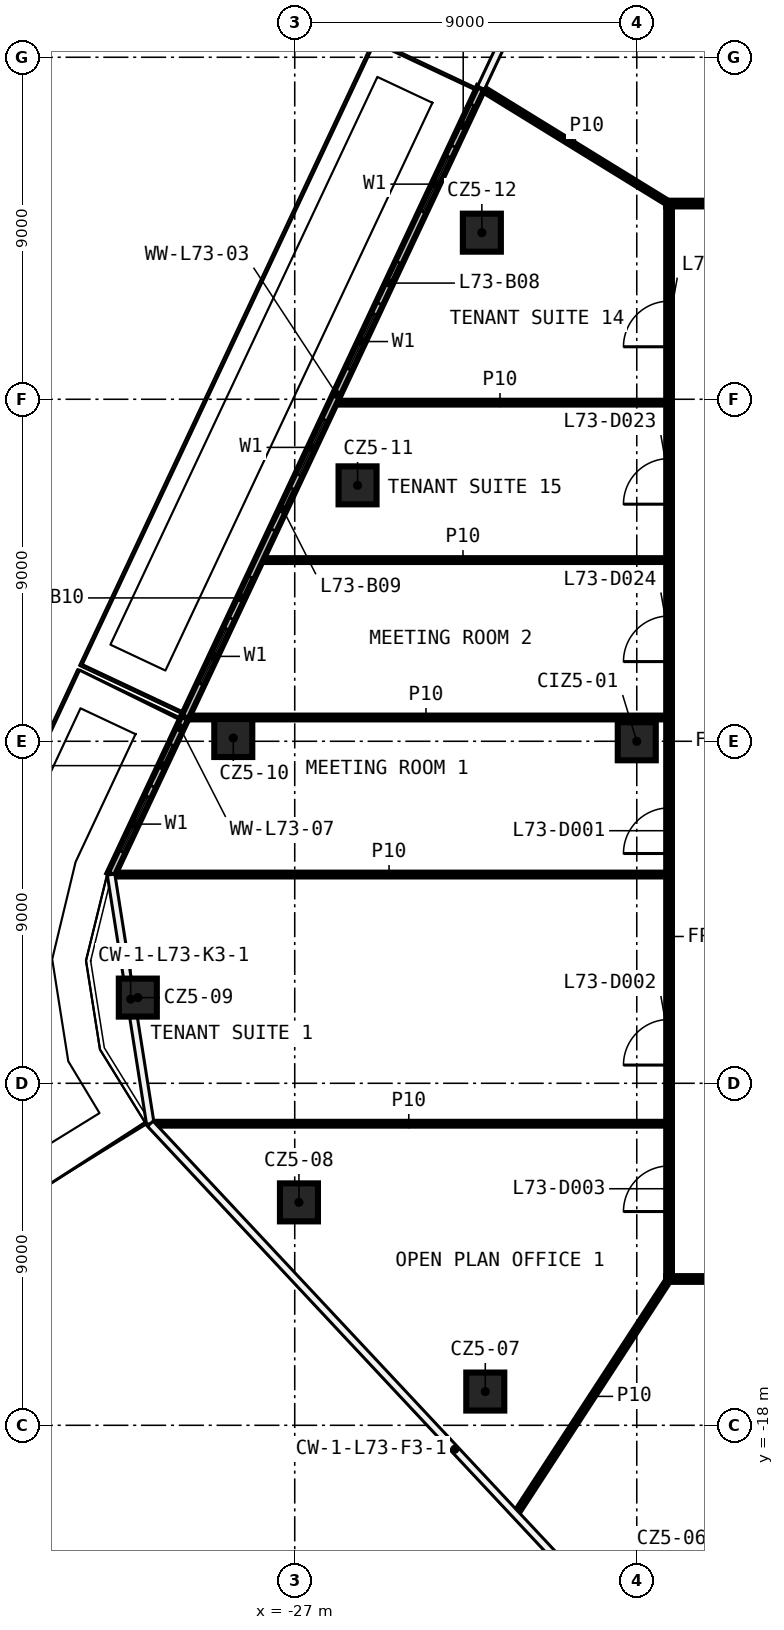
"""IFC4 building model, lengths in metres.
Left out: names, types, materials, properties, quantities, classifications, styles, units other than length and angle.
Written with IfcOpenShell. Run it as: python <this file> out.ifc"""

import sys

from ifc_helpers import new_model, si_unit, direction, frame, frame_2d, origin, origin_2d, place, context, subcontext, project, spatial, rectangle, extrude, element, fill, save


model = new_model("IFC4")
c1 = context("Model", 3, precision=1e-05, world=origin(), true_north=direction((0.0, 1.0)))
c2 = subcontext(c1, "Body", "Model", "MODEL_VIEW")
j1 = project(units=[si_unit("LENGTHUNIT", "METRE"), si_unit("PLANEANGLEUNIT", "RADIAN")], contexts=[c1])
p1 = place(None, origin())
s1 = spatial("IfcSite", under=j1, at=p1, CompositionType="ELEMENT")
p2 = place(p1, origin())
s2 = spatial("IfcBuilding", under=s1, at=p2, CompositionType="ELEMENT")
p3 = place(p2, frame((0.0, 0.0, 340.4)))
s3 = spatial("IfcBuildingStorey", under=s2, at=p3, CompositionType="ELEMENT", Elevation=340.4)
for number, where, z_axis, x_axis in (
    (1, (-21.986, -17.112, 0.0), (0.0, 0.0, 1.0), (1.0, 0.0, 0.0)),
    (2, (-26.889, -12.134, 0.0), (0.0, 0.0, 1.0), (1.0, 0.0, 0.0)),
    (3, (-31.129, -6.745, 0.0), (0.0, 0.0, 1.0), (1.0, 0.0, 0.0)),
    (4, (-28.617, 0.086, 0.0), (0.0, 0.0, 1.0), (1.0, 0.0, 0.0)),
    (5, (-25.347, 6.735, 0.0), (0.0, 0.0, 1.0), (1.0, 0.0, 0.0)),
    (6, (-22.076, 13.384, 0.0), (0.0, 0.0, 1.0), (1.0, 0.0, 0.0)),
    (7, (-18.0, 0.0, 0.0), (0.0, 0.0, 1.0), (1.0, 0.0, 0.0)),
):
    element("IfcColumn", number, at=place(p3, frame(where, z_axis=z_axis, x_axis=x_axis)), inside=s3, PredefinedType="COLUMN", context=c2, shape_type="SweptSolid", body=[
        extrude(rectangle(XDim=1.0, YDim=1.0, at=origin_2d()), origin(), (0.0, 0.0, 1.0), 3.82),
    ])
p4 = place(p3, frame((17.225, -14.15, 0.0), z_axis=(0.0, 0.0, 1.0), x_axis=(-1.0, 0.0, 0.0)))
e8 = element("IfcWall", 8, at=p4, inside=s3, PredefinedType="PARTITIONING", context=c2, shape_type="SweptSolid", body=[
    extrude(rectangle(XDim=34.45, YDim=0.15, at=frame_2d((17.225, 0.0))), origin(), (0.0, 0.0, 1.0), 3.82),
])
p5 = place(p4, frame((24.639, 0.0, 0.0)))
e9 = element("IfcOpeningElement", 9, at=p5, cuts=e8, PredefinedType="OPENING", context=c2, shape_type="SweptSolid", body=[
    extrude(rectangle(XDim=1.2, YDim=2.1, at=frame_2d((0.6, 1.05))), frame((0.0, 0.085, 0.0), z_axis=(0.0, -1.0, 0.0), x_axis=(1.0, 0.0, 0.0)), (0.0, 0.0, 1.0), 0.17),
])
p6 = place(p4, frame((20.005, 0.0, 0.0)))
e10 = element("IfcOpeningElement", 10, at=p6, cuts=e8, PredefinedType="OPENING", context=c2, shape_type="SweptSolid", body=[
    extrude(rectangle(XDim=1.2, YDim=2.1, at=frame_2d((0.6, 1.05))), frame((0.0, 0.085, 0.0), z_axis=(0.0, -1.0, 0.0), x_axis=(1.0, 0.0, 0.0)), (0.0, 0.0, 1.0), 0.17),
])
p7 = place(p4, frame((15.367, 0.0, 0.0)))
e11 = element("IfcOpeningElement", 11, at=p7, cuts=e8, PredefinedType="OPENING", context=c2, shape_type="SweptSolid", body=[
    extrude(rectangle(XDim=1.2, YDim=2.1, at=frame_2d((0.6, 1.05))), frame((0.0, 0.085, 0.0), z_axis=(0.0, -1.0, 0.0), x_axis=(1.0, 0.0, 0.0)), (0.0, 0.0, 1.0), 0.17),
])
p8 = place(p4, frame((10.73, 0.0, 0.0)))
e12 = element("IfcOpeningElement", 12, at=p8, cuts=e8, PredefinedType="OPENING", context=c2, shape_type="SweptSolid", body=[
    extrude(rectangle(XDim=1.2, YDim=2.1, at=frame_2d((0.6, 1.05))), frame((0.0, 0.085, 0.0), z_axis=(0.0, -1.0, 0.0), x_axis=(1.0, 0.0, 0.0)), (0.0, 0.0, 1.0), 0.17),
])
p9 = place(p4, frame((6.097, 0.0, 0.0)))
e13 = element("IfcOpeningElement", 13, at=p9, cuts=e8, PredefinedType="OPENING", context=c2, shape_type="SweptSolid", body=[
    extrude(rectangle(XDim=1.2, YDim=2.1, at=frame_2d((0.6, 1.05))), frame((0.0, 0.085, 0.0), z_axis=(0.0, -1.0, 0.0), x_axis=(1.0, 0.0, 0.0)), (0.0, 0.0, 1.0), 0.17),
])
p10 = place(p4, frame((1.83, 0.0, 0.0)))
e14 = element("IfcOpeningElement", 14, at=p10, cuts=e8, PredefinedType="OPENING", context=c2, shape_type="SweptSolid", body=[
    extrude(rectangle(XDim=1.2, YDim=2.1, at=frame_2d((0.6, 1.05))), frame((0.0, 0.085, 0.0), z_axis=(0.0, -1.0, 0.0), x_axis=(1.0, 0.0, 0.0)), (0.0, 0.0, 1.0), 0.17),
])
p11 = place(p3, frame((-30.773, -10.064, 0.0), z_axis=(0.0, 0.0, 1.0), x_axis=(1.0, 0.0, 0.0)))
e15 = element("IfcWall", 15, at=p11, inside=s3, PredefinedType="PARTITIONING", context=c2, shape_type="SweptSolid", body=[
    extrude(rectangle(XDim=13.548, YDim=0.1, at=frame_2d((6.774, 0.0))), origin(), (0.0, 0.0, 1.0), 3.82),
])
p12 = place(p3, frame((-31.811, -3.507, 0.0), z_axis=(0.0, 0.0, 1.0), x_axis=(1.0, 0.0, 0.0)))
e16 = element("IfcWall", 16, at=p12, inside=s3, PredefinedType="PARTITIONING", context=c2, shape_type="SweptSolid", body=[
    extrude(rectangle(XDim=14.586, YDim=0.1, at=frame_2d((7.293, 0.0))), origin(), (0.0, 0.0, 1.0), 3.82),
])
p13 = place(p3, frame((-29.867, 0.626, 0.0), z_axis=(0.0, 0.0, 1.0), x_axis=(1.0, 0.0, 0.0)))
e17 = element("IfcWall", 17, at=p13, inside=s3, PredefinedType="PARTITIONING", context=c2, shape_type="SweptSolid", body=[
    extrude(rectangle(XDim=12.642, YDim=0.1, at=frame_2d((6.321, 0.0))), origin(), (0.0, 0.0, 1.0), 3.82),
])
p14 = place(p3, frame((-27.92, 4.768, 0.0), z_axis=(0.0, 0.0, 1.0), x_axis=(1.0, 0.0, 0.0)))
e18 = element("IfcWall", 18, at=p14, inside=s3, PredefinedType="PARTITIONING", context=c2, shape_type="SweptSolid", body=[
    extrude(rectangle(XDim=10.695, YDim=0.1, at=frame_2d((5.347, 0.0))), origin(), (0.0, 0.0, 1.0), 3.82),
])
p15 = place(p3, frame((-25.972, 8.911, 0.0), z_axis=(0.0, 0.0, 1.0), x_axis=(1.0, 0.0, 0.0)))
e19 = element("IfcWall", 19, at=p15, inside=s3, PredefinedType="PARTITIONING", context=c2, shape_type="SweptSolid", body=[
    extrude(rectangle(XDim=8.747, YDim=0.1, at=frame_2d((4.374, 0.0))), origin(), (0.0, 0.0, 1.0), 3.82),
])
p16 = place(p3, frame((-17.225, 14.15, 0.0), z_axis=(0.0, 0.0, 1.0), x_axis=(1.0, 0.0, 0.0)))
e20 = element("IfcWall", 20, at=p16, inside=s3, PredefinedType="PARTITIONING", context=c2, shape_type="SweptSolid", body=[
    extrude(rectangle(XDim=34.45, YDim=0.15, at=frame_2d((17.225, 0.0))), origin(), (0.0, 0.0, 1.0), 3.82),
])
p17 = place(p16, frame((24.708, 0.0, 0.0)))
e21 = element("IfcOpeningElement", 21, at=p17, cuts=e20, PredefinedType="OPENING", context=c2, shape_type="SweptSolid", body=[
    extrude(rectangle(XDim=1.2, YDim=2.1, at=frame_2d((0.6, 1.05))), frame((0.0, 0.085, 0.0), z_axis=(0.0, -1.0, 0.0), x_axis=(1.0, 0.0, 0.0)), (0.0, 0.0, 1.0), 0.17),
])
p18 = place(p16, frame((20.038, 0.0, 0.0)))
e22 = element("IfcOpeningElement", 22, at=p18, cuts=e20, PredefinedType="OPENING", context=c2, shape_type="SweptSolid", body=[
    extrude(rectangle(XDim=1.2, YDim=2.1, at=frame_2d((0.6, 1.05))), frame((0.0, 0.085, 0.0), z_axis=(0.0, -1.0, 0.0), x_axis=(1.0, 0.0, 0.0)), (0.0, 0.0, 1.0), 0.17),
])
p19 = place(p16, frame((15.367, 0.0, 0.0)))
e23 = element("IfcOpeningElement", 23, at=p19, cuts=e20, PredefinedType="OPENING", context=c2, shape_type="SweptSolid", body=[
    extrude(rectangle(XDim=1.2, YDim=2.1, at=frame_2d((0.6, 1.05))), frame((0.0, 0.085, 0.0), z_axis=(0.0, -1.0, 0.0), x_axis=(1.0, 0.0, 0.0)), (0.0, 0.0, 1.0), 0.17),
])
p20 = place(p16, frame((10.695, 0.0, 0.0)))
e24 = element("IfcOpeningElement", 24, at=p20, cuts=e20, PredefinedType="OPENING", context=c2, shape_type="SweptSolid", body=[
    extrude(rectangle(XDim=1.2, YDim=2.1, at=frame_2d((0.6, 1.05))), frame((0.0, 0.085, 0.0), z_axis=(0.0, -1.0, 0.0), x_axis=(1.0, 0.0, 0.0)), (0.0, 0.0, 1.0), 0.17),
])
p21 = place(p16, frame((6.025, 0.0, 0.0)))
e25 = element("IfcOpeningElement", 25, at=p21, cuts=e20, PredefinedType="OPENING", context=c2, shape_type="SweptSolid", body=[
    extrude(rectangle(XDim=1.2, YDim=2.1, at=frame_2d((0.6, 1.05))), frame((0.0, 0.085, 0.0), z_axis=(0.0, -1.0, 0.0), x_axis=(1.0, 0.0, 0.0)), (0.0, 0.0, 1.0), 0.17),
])
p22 = place(p16, frame((1.698, 0.0, 0.0)))
e26 = element("IfcOpeningElement", 26, at=p22, cuts=e20, PredefinedType="OPENING", context=c2, shape_type="SweptSolid", body=[
    extrude(rectangle(XDim=1.2, YDim=2.1, at=frame_2d((0.6, 1.05))), frame((0.0, 0.085, 0.0), z_axis=(0.0, -1.0, 0.0), x_axis=(1.0, 0.0, 0.0)), (0.0, 0.0, 1.0), 0.17),
])
p23 = place(p3, frame((-21.176, -20.328, 0.0), z_axis=(0.0, 0.0, 1.0), x_axis=(0.5459597113, 0.837811430834, 0.0)))
e27 = element("IfcWall", 27, at=p23, inside=s3, PredefinedType="PARTITIONING", context=c2, shape_type="SweptSolid", body=[
    extrude(rectangle(XDim=7.374, YDim=0.1, at=frame_2d((3.687, 0.0))), origin(), (0.0, 0.0, 1.0), 3.82),
])
p24 = place(p3, frame((-17.15, -14.075, 0.0), z_axis=(0.0, 0.0, 1.0), x_axis=(0.0, 1.0, 0.0)))
e28 = element("IfcWall", 28, at=p24, inside=s3, PredefinedType="PARTITIONING", context=c2, shape_type="SweptSolid", body=[
    extrude(rectangle(XDim=28.15, YDim=0.15, at=frame_2d((14.075, 0.0))), origin(), (0.0, 0.0, 1.0), 3.82),
])
p25 = place(p24, frame((11.122, 0.0, 0.0)))
e29 = element("IfcOpeningElement", 29, at=p25, cuts=e28, PredefinedType="OPENING", context=c2, shape_type="SweptSolid", body=[
    extrude(rectangle(XDim=1.2, YDim=2.1, at=frame_2d((0.6, 1.05))), frame((0.0, 0.085, 0.0), z_axis=(0.0, -1.0, 0.0), x_axis=(1.0, 0.0, 0.0)), (0.0, 0.0, 1.0), 0.17),
])
p26 = place(p24, frame((5.555, 0.0, 0.0)))
e30 = element("IfcOpeningElement", 30, at=p26, cuts=e28, PredefinedType="OPENING", context=c2, shape_type="SweptSolid", body=[
    extrude(rectangle(XDim=1.2, YDim=2.1, at=frame_2d((0.6, 1.05))), frame((0.0, 0.085, 0.0), z_axis=(0.0, -1.0, 0.0), x_axis=(1.0, 0.0, 0.0)), (0.0, 0.0, 1.0), 0.17),
])
p27 = place(p24, frame((1.7, 0.0, 0.0)))
e31 = element("IfcOpeningElement", 31, at=p27, cuts=e28, PredefinedType="OPENING", context=c2, shape_type="SweptSolid", body=[
    extrude(rectangle(XDim=1.2, YDim=2.1, at=frame_2d((0.6, 1.05))), frame((0.0, 0.085, 0.0), z_axis=(0.0, -1.0, 0.0), x_axis=(1.0, 0.0, 0.0)), (0.0, 0.0, 1.0), 0.17),
])
p28 = place(p24, frame((24.457, 0.0, 0.0)))
e32 = element("IfcOpeningElement", 32, at=p28, cuts=e28, PredefinedType="OPENING", context=c2, shape_type="SweptSolid", body=[
    extrude(rectangle(XDim=1.2, YDim=2.1, at=frame_2d((0.6, 1.05))), frame((0.0, 0.085, 0.0), z_axis=(0.0, -1.0, 0.0), x_axis=(1.0, 0.0, 0.0)), (0.0, 0.0, 1.0), 0.17),
])
p29 = place(p24, frame((20.314, 0.0, 0.0)))
e33 = element("IfcOpeningElement", 33, at=p29, cuts=e28, PredefinedType="OPENING", context=c2, shape_type="SweptSolid", body=[
    extrude(rectangle(XDim=1.2, YDim=2.1, at=frame_2d((0.6, 1.05))), frame((0.0, 0.085, 0.0), z_axis=(0.0, -1.0, 0.0), x_axis=(1.0, 0.0, 0.0)), (0.0, 0.0, 1.0), 0.17),
])
p30 = place(p24, frame((16.172, 0.0, 0.0)))
e34 = element("IfcOpeningElement", 34, at=p30, cuts=e28, PredefinedType="OPENING", context=c2, shape_type="SweptSolid", body=[
    extrude(rectangle(XDim=1.2, YDim=2.1, at=frame_2d((0.6, 1.05))), frame((0.0, 0.085, 0.0), z_axis=(0.0, -1.0, 0.0), x_axis=(1.0, 0.0, 0.0)), (0.0, 0.0, 1.0), 0.17),
])
p31 = place(p3, frame((-22.081, 17.185, 0.0), z_axis=(0.0, 0.0, 1.0), x_axis=(0.85162357217, -0.524153881341, 0.0)))
e35 = element("IfcWall", 35, at=p31, inside=s3, PredefinedType="PARTITIONING", context=c2, shape_type="SweptSolid", body=[
    extrude(rectangle(XDim=5.791, YDim=0.1, at=frame_2d((2.895, 0.0))), origin(), (0.0, 0.0, 1.0), 3.82),
])
p32 = place(p3, frame((-22.099, 17.195, 0.0), z_axis=(0.0, 0.0, 1.0), x_axis=(-0.425492631057, -0.904961889206, 0.0)))
e36 = element("IfcWall", 36, at=p32, inside=s3, PredefinedType="SOLIDWALL", context=c2, shape_type="SweptSolid", body=[
    extrude(rectangle(XDim=18.309, YDim=0.2, at=frame_2d((9.155, 0.0))), origin(), (0.0, 0.0, 1.0), 3.82),
])
p33 = place(p32, frame((2.0, 0.0, 0.6)))
e37 = element("IfcOpeningElement", 37, at=p33, cuts=e36, PredefinedType="OPENING", context=c2, shape_type="SweptSolid", body=[
    extrude(rectangle(XDim=1.6, YDim=2.4, at=frame_2d((0.8, 1.2))), frame((0.0, 0.11, 0.0), z_axis=(0.0, -1.0, 0.0), x_axis=(1.0, 0.0, 0.0)), (0.0, 0.0, 1.0), 0.22),
])
p34 = place(p32, frame((0.5, 0.0, 0.0)))
e38 = element("IfcOpeningElement", 38, at=p34, cuts=e36, PredefinedType="OPENING", context=c2, shape_type="SweptSolid", body=[
    extrude(rectangle(XDim=1.2, YDim=2.4, at=frame_2d((0.6, 1.2))), frame((0.0, 0.11, 0.0), z_axis=(0.0, -1.0, 0.0), x_axis=(1.0, 0.0, 0.0)), (0.0, 0.0, 1.0), 0.22),
])
p35 = place(p32, frame((6.577, 0.0, 0.6)))
e39 = element("IfcOpeningElement", 39, at=p35, cuts=e36, PredefinedType="OPENING", context=c2, shape_type="SweptSolid", body=[
    extrude(rectangle(XDim=1.6, YDim=2.4, at=frame_2d((0.8, 1.2))), frame((0.0, 0.11, 0.0), z_axis=(0.0, -1.0, 0.0), x_axis=(1.0, 0.0, 0.0)), (0.0, 0.0, 1.0), 0.22),
])
p36 = place(p32, frame((5.077, 0.0, 0.0)))
e40 = element("IfcOpeningElement", 40, at=p36, cuts=e36, PredefinedType="OPENING", context=c2, shape_type="SweptSolid", body=[
    extrude(rectangle(XDim=1.2, YDim=2.4, at=frame_2d((0.6, 1.2))), frame((0.0, 0.11, 0.0), z_axis=(0.0, -1.0, 0.0), x_axis=(1.0, 0.0, 0.0)), (0.0, 0.0, 1.0), 0.22),
])
p37 = place(p32, frame((9.655, 0.0, 0.6)))
e41 = element("IfcOpeningElement", 41, at=p37, cuts=e36, PredefinedType="OPENING", context=c2, shape_type="SweptSolid", body=[
    extrude(rectangle(XDim=1.6, YDim=2.4, at=frame_2d((0.8, 1.2))), frame((0.0, 0.11, 0.0), z_axis=(0.0, -1.0, 0.0), x_axis=(1.0, 0.0, 0.0)), (0.0, 0.0, 1.0), 0.22),
])
p38 = place(p32, frame((11.655, 0.0, 0.0)))
e42 = element("IfcOpeningElement", 42, at=p38, cuts=e36, PredefinedType="OPENING", context=c2, shape_type="SweptSolid", body=[
    extrude(rectangle(XDim=1.2, YDim=2.4, at=frame_2d((0.6, 1.2))), frame((0.0, 0.11, 0.0), z_axis=(0.0, -1.0, 0.0), x_axis=(1.0, 0.0, 0.0)), (0.0, 0.0, 1.0), 0.22),
])
p39 = place(p32, frame((15.732, 0.0, 0.6)))
e43 = element("IfcOpeningElement", 43, at=p39, cuts=e36, PredefinedType="OPENING", context=c2, shape_type="SweptSolid", body=[
    extrude(rectangle(XDim=1.6, YDim=2.4, at=frame_2d((0.8, 1.2))), frame((0.0, 0.11, 0.0), z_axis=(0.0, -1.0, 0.0), x_axis=(1.0, 0.0, 0.0)), (0.0, 0.0, 1.0), 0.22),
])
p40 = place(p32, frame((14.232, 0.0, 0.0)))
e44 = element("IfcOpeningElement", 44, at=p40, cuts=e36, PredefinedType="OPENING", context=c2, shape_type="SweptSolid", body=[
    extrude(rectangle(XDim=1.2, YDim=2.4, at=frame_2d((0.6, 1.2))), frame((0.0, 0.11, 0.0), z_axis=(0.0, -1.0, 0.0), x_axis=(1.0, 0.0, 0.0)), (0.0, 0.0, 1.0), 0.22),
])
p41 = place(p3, frame((-29.889, 0.626, 0.0), z_axis=(0.0, 0.0, 1.0), x_axis=(-0.425531877643, -0.904943435309, 0.0)))
e45 = element("IfcWall", 45, at=p41, inside=s3, PredefinedType="SOLIDWALL", context=c2, shape_type="SweptSolid", body=[
    extrude(rectangle(XDim=4.567, YDim=0.2, at=frame_2d((2.284, 0.0))), origin(), (0.0, 0.0, 1.0), 3.82),
])
p42 = place(p41, frame((2.3, 0.0, 0.6)))
e46 = element("IfcOpeningElement", 46, at=p42, cuts=e45, PredefinedType="OPENING", context=c2, shape_type="SweptSolid", body=[
    extrude(rectangle(XDim=1.6, YDim=2.4, at=frame_2d((0.8, 1.2))), frame((0.0, 0.11, 0.0), z_axis=(0.0, -1.0, 0.0), x_axis=(1.0, 0.0, 0.0)), (0.0, 0.0, 1.0), 0.22),
])
p43 = place(p41, frame((0.8, 0.0, 0.0)))
e47 = element("IfcOpeningElement", 47, at=p43, cuts=e45, PredefinedType="OPENING", context=c2, shape_type="SweptSolid", body=[
    extrude(rectangle(XDim=1.2, YDim=2.4, at=frame_2d((0.6, 1.2))), frame((0.0, 0.11, 0.0), z_axis=(0.0, -1.0, 0.0), x_axis=(1.0, 0.0, 0.0)), (0.0, 0.0, 1.0), 0.22),
])
p44 = place(p25, origin())
e48 = element("IfcDoor", 48, at=p44, inside=s3, OperationType="SINGLE_SWING_RIGHT", PredefinedType="DOOR", context=c2, shape_type="SweptSolid", body=[
    extrude(rectangle(XDim=1.2, YDim=2.1, at=frame_2d((0.6, 1.05))), frame((0.0, 0.025, 0.0), z_axis=(0.0, -1.0, 0.0), x_axis=(1.0, 0.0, 0.0)), (0.0, 0.0, 1.0), 0.05),
])
fill(e29, e48)
p45 = place(p26, origin())
e49 = element("IfcDoor", 49, at=p45, inside=s3, OperationType="SINGLE_SWING_LEFT", PredefinedType="DOOR", context=c2, shape_type="SweptSolid", body=[
    extrude(rectangle(XDim=1.2, YDim=2.1, at=frame_2d((0.6, 1.05))), frame((0.0, 0.025, 0.0), z_axis=(0.0, -1.0, 0.0), x_axis=(1.0, 0.0, 0.0)), (0.0, 0.0, 1.0), 0.05),
])
fill(e30, e49)
p46 = place(p27, origin())
e50 = element("IfcDoor", 50, at=p46, inside=s3, OperationType="SINGLE_SWING_RIGHT", PredefinedType="DOOR", context=c2, shape_type="SweptSolid", body=[
    extrude(rectangle(XDim=1.2, YDim=2.1, at=frame_2d((0.6, 1.05))), frame((0.0, 0.025, 0.0), z_axis=(0.0, -1.0, 0.0), x_axis=(1.0, 0.0, 0.0)), (0.0, 0.0, 1.0), 0.05),
])
fill(e31, e50)
p47 = place(p28, origin())
e51 = element("IfcDoor", 51, at=p47, inside=s3, OperationType="SINGLE_SWING_LEFT", PredefinedType="DOOR", context=c2, shape_type="SweptSolid", body=[
    extrude(rectangle(XDim=1.2, YDim=2.1, at=frame_2d((0.6, 1.05))), frame((0.0, 0.025, 0.0), z_axis=(0.0, -1.0, 0.0), x_axis=(1.0, 0.0, 0.0)), (0.0, 0.0, 1.0), 0.05),
])
fill(e32, e51)
p48 = place(p29, origin())
e52 = element("IfcDoor", 52, at=p48, inside=s3, OperationType="SINGLE_SWING_RIGHT", PredefinedType="DOOR", context=c2, shape_type="SweptSolid", body=[
    extrude(rectangle(XDim=1.2, YDim=2.1, at=frame_2d((0.6, 1.05))), frame((0.0, 0.025, 0.0), z_axis=(0.0, -1.0, 0.0), x_axis=(1.0, 0.0, 0.0)), (0.0, 0.0, 1.0), 0.05),
])
fill(e33, e52)
p49 = place(p30, origin())
e53 = element("IfcDoor", 53, at=p49, inside=s3, OperationType="SINGLE_SWING_LEFT", PredefinedType="DOOR", context=c2, shape_type="SweptSolid", body=[
    extrude(rectangle(XDim=1.2, YDim=2.1, at=frame_2d((0.6, 1.05))), frame((0.0, 0.025, 0.0), z_axis=(0.0, -1.0, 0.0), x_axis=(1.0, 0.0, 0.0)), (0.0, 0.0, 1.0), 0.05),
])
fill(e34, e53)
p50 = place(p33, origin())
e54 = element("IfcWindow", 54, at=p50, inside=s3, PartitioningType="SINGLE_PANEL", PredefinedType="WINDOW", context=c2, shape_type="SweptSolid", body=[
    extrude(rectangle(XDim=1.6, YDim=2.4, at=frame_2d((0.8, 1.2))), frame((0.0, 0.03, 0.0), z_axis=(0.0, -1.0, 0.0), x_axis=(1.0, 0.0, 0.0)), (0.0, 0.0, 1.0), 0.06),
])
fill(e37, e54)
p51 = place(p34, origin())
e55 = element("IfcDoor", 55, at=p51, inside=s3, OperationType="SLIDING_TO_LEFT", PredefinedType="DOOR", context=c2, shape_type="SweptSolid", body=[
    extrude(rectangle(XDim=1.2, YDim=2.4, at=frame_2d((0.6, 1.2))), frame((0.0, 0.025, 0.0), z_axis=(0.0, -1.0, 0.0), x_axis=(1.0, 0.0, 0.0)), (0.0, 0.0, 1.0), 0.05),
])
fill(e38, e55)
p52 = place(p35, origin())
e56 = element("IfcWindow", 56, at=p52, inside=s3, PartitioningType="SINGLE_PANEL", PredefinedType="WINDOW", context=c2, shape_type="SweptSolid", body=[
    extrude(rectangle(XDim=1.6, YDim=2.4, at=frame_2d((0.8, 1.2))), frame((0.0, 0.03, 0.0), z_axis=(0.0, -1.0, 0.0), x_axis=(1.0, 0.0, 0.0)), (0.0, 0.0, 1.0), 0.06),
])
fill(e39, e56)
p53 = place(p36, origin())
e57 = element("IfcDoor", 57, at=p53, inside=s3, OperationType="SLIDING_TO_LEFT", PredefinedType="DOOR", context=c2, shape_type="SweptSolid", body=[
    extrude(rectangle(XDim=1.2, YDim=2.4, at=frame_2d((0.6, 1.2))), frame((0.0, 0.025, 0.0), z_axis=(0.0, -1.0, 0.0), x_axis=(1.0, 0.0, 0.0)), (0.0, 0.0, 1.0), 0.05),
])
fill(e40, e57)
p54 = place(p37, origin())
e58 = element("IfcWindow", 58, at=p54, inside=s3, PartitioningType="SINGLE_PANEL", PredefinedType="WINDOW", context=c2, shape_type="SweptSolid", body=[
    extrude(rectangle(XDim=1.6, YDim=2.4, at=frame_2d((0.8, 1.2))), frame((0.0, 0.03, 0.0), z_axis=(0.0, -1.0, 0.0), x_axis=(1.0, 0.0, 0.0)), (0.0, 0.0, 1.0), 0.06),
])
fill(e41, e58)
p55 = place(p38, origin())
e59 = element("IfcDoor", 59, at=p55, inside=s3, OperationType="SLIDING_TO_LEFT", PredefinedType="DOOR", context=c2, shape_type="SweptSolid", body=[
    extrude(rectangle(XDim=1.2, YDim=2.4, at=frame_2d((0.6, 1.2))), frame((0.0, 0.025, 0.0), z_axis=(0.0, -1.0, 0.0), x_axis=(1.0, 0.0, 0.0)), (0.0, 0.0, 1.0), 0.05),
])
fill(e42, e59)
p56 = place(p39, origin())
e60 = element("IfcWindow", 60, at=p56, inside=s3, PartitioningType="SINGLE_PANEL", PredefinedType="WINDOW", context=c2, shape_type="SweptSolid", body=[
    extrude(rectangle(XDim=1.6, YDim=2.4, at=frame_2d((0.8, 1.2))), frame((0.0, 0.03, 0.0), z_axis=(0.0, -1.0, 0.0), x_axis=(1.0, 0.0, 0.0)), (0.0, 0.0, 1.0), 0.06),
])
fill(e43, e60)
p57 = place(p40, origin())
e61 = element("IfcDoor", 61, at=p57, inside=s3, OperationType="SLIDING_TO_LEFT", PredefinedType="DOOR", context=c2, shape_type="SweptSolid", body=[
    extrude(rectangle(XDim=1.2, YDim=2.4, at=frame_2d((0.6, 1.2))), frame((0.0, 0.025, 0.0), z_axis=(0.0, -1.0, 0.0), x_axis=(1.0, 0.0, 0.0)), (0.0, 0.0, 1.0), 0.05),
])
fill(e44, e61)
p58 = place(p42, origin())
e62 = element("IfcWindow", 62, at=p58, inside=s3, PartitioningType="SINGLE_PANEL", PredefinedType="WINDOW", context=c2, shape_type="SweptSolid", body=[
    extrude(rectangle(XDim=1.6, YDim=2.4, at=frame_2d((0.8, 1.2))), frame((0.0, 0.03, 0.0), z_axis=(0.0, -1.0, 0.0), x_axis=(1.0, 0.0, 0.0)), (0.0, 0.0, 1.0), 0.06),
])
fill(e46, e62)
p59 = place(p43, origin())
e63 = element("IfcDoor", 63, at=p59, inside=s3, OperationType="SLIDING_TO_LEFT", PredefinedType="DOOR", context=c2, shape_type="SweptSolid", body=[
    extrude(rectangle(XDim=1.2, YDim=2.4, at=frame_2d((0.6, 1.2))), frame((0.0, 0.025, 0.0), z_axis=(0.0, -1.0, 0.0), x_axis=(1.0, 0.0, 0.0)), (0.0, 0.0, 1.0), 0.05),
])
fill(e47, e63)
save(model, sys.argv[1])
